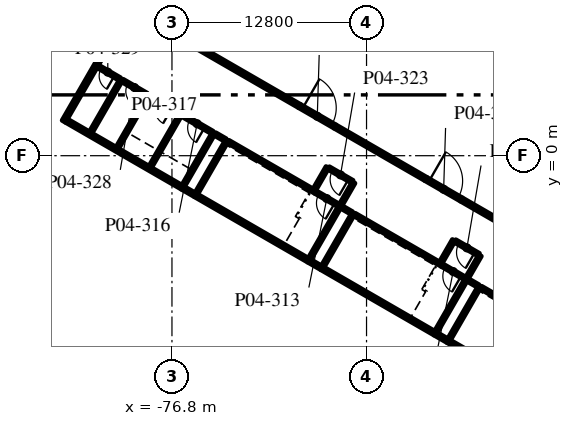
"""IFC4 building model, lengths in metres.
Left out: names, types, materials, properties, quantities, classifications, styles, units other than length and angle.
Written with IfcOpenShell. Run it as: python <this file> out.ifc"""

import sys

from ifc_helpers import new_model, si_unit, direction, frame, frame_2d, origin, place, context, subcontext, project, spatial, rectangle, extrude, element, fill, save


model = new_model("IFC4")
c1 = context("Model", 3, precision=1e-05, world=origin(), true_north=direction((0.0, 1.0)))
c2 = subcontext(c1, "Body", "Model", "MODEL_VIEW")
j1 = project(units=[si_unit("LENGTHUNIT", "METRE"), si_unit("PLANEANGLEUNIT", "RADIAN")], contexts=[c1])
p1 = place(None, origin())
s1 = spatial("IfcSite", under=j1, at=p1, CompositionType="ELEMENT")
p2 = place(p1, origin())
s2 = spatial("IfcBuilding", under=s1, at=p2, CompositionType="ELEMENT")
p3 = place(p2, frame((0.0, 0.0, 21.6)))
s3 = spatial("IfcBuildingStorey", under=s2, at=p3, CompositionType="ELEMENT", Elevation=21.6)
p4 = place(p3, frame((-83.915, 2.26, 0.0), z_axis=(0.0, 0.0, 1.0), x_axis=(0.499999331568, 0.866025789703, 0.0)))
e1 = element("IfcWall", 1, at=p4, inside=s3, PredefinedType="SOLIDWALL", context=c2, shape_type="SweptSolid", body=[
    extrude(rectangle(XDim=8.625, YDim=0.25, at=frame_2d((4.312, 0.0))), origin(), (0.0, 0.0, 1.0), 4.5),
])
p5 = place(p3, frame((-51.782, -6.333, 0.0), z_axis=(0.0, 0.0, 1.0), x_axis=(-0.866028853923, 0.499994024137, 0.0)))
e2 = element("IfcWall", 2, at=p5, inside=s3, PredefinedType="SOLIDWALL", context=c2, shape_type="SweptSolid", body=[
    extrude(rectangle(XDim=6.9, YDim=0.25, at=frame_2d((3.45, 0.0))), origin(), (0.0, 0.0, 1.0), 4.5),
])
p6 = place(p3, frame((-60.095, -1.533, 0.0), z_axis=(0.0, 0.0, 1.0), x_axis=(0.866036505625, -0.499980770555, 0.0)))
e3 = element("IfcWall", 3, at=p6, inside=s3, PredefinedType="SOLIDWALL", context=c2, shape_type="SweptSolid", body=[
    extrude(rectangle(XDim=2.7, YDim=0.25, at=frame_2d((1.35, 0.0))), origin(), (0.0, 0.0, 1.0), 4.5),
])
p7 = place(p6, frame((0.25, 0.0, 0.0)))
e4 = element("IfcOpeningElement", 4, at=p7, cuts=e3, PredefinedType="OPENING", context=c2, shape_type="SweptSolid", body=[
    extrude(rectangle(XDim=2.2, YDim=2.1, at=frame_2d((1.1, 1.05))), frame((0.0, 0.135, 0.0), z_axis=(0.0, -1.0, 0.0), x_axis=(1.0, 0.0, 0.0)), (0.0, 0.0, 1.0), 0.27),
])
p8 = place(p3, frame((-60.095, -1.533, 0.0), z_axis=(0.0, 0.0, 1.0), x_axis=(-0.866013532718, 0.500020560727, 0.0)))
e5 = element("IfcWall", 5, at=p8, inside=s3, PredefinedType="SOLIDWALL", context=c2, shape_type="SweptSolid", body=[
    extrude(rectangle(XDim=6.9, YDim=0.25, at=frame_2d((3.45, 0.0))), origin(), (0.0, 0.0, 1.0), 4.5),
])
p9 = place(p3, frame((-68.409, 3.267, 0.0), z_axis=(0.0, 0.0, 1.0), x_axis=(0.866059108428, -0.4999416173, 0.0)))
e6 = element("IfcWall", 6, at=p9, inside=s3, PredefinedType="SOLIDWALL", context=c2, shape_type="SweptSolid", body=[
    extrude(rectangle(XDim=2.7, YDim=0.25, at=frame_2d((1.35, 0.0))), origin(), (0.0, 0.0, 1.0), 4.5),
])
p10 = place(p9, frame((0.25, 0.0, 0.0)))
e7 = element("IfcOpeningElement", 7, at=p10, cuts=e6, PredefinedType="OPENING", context=c2, shape_type="SweptSolid", body=[
    extrude(rectangle(XDim=2.2, YDim=2.1, at=frame_2d((1.1, 1.05))), frame((0.0, 0.135, 0.0), z_axis=(0.0, -1.0, 0.0), x_axis=(1.0, 0.0, 0.0)), (0.0, 0.0, 1.0), 0.27),
])
p11 = place(p3, frame((-68.409, 3.267, 0.0), z_axis=(0.0, 0.0, 1.0), x_axis=(-0.866017240552, 0.500014138866, 0.0)))
e8 = element("IfcWall", 8, at=p11, inside=s3, PredefinedType="SOLIDWALL", context=c2, shape_type="SweptSolid", body=[
    extrude(rectangle(XDim=12.8, YDim=0.25, at=frame_2d((6.4, 0.0))), origin(), (0.0, 0.0, 1.0), 4.5),
])
p12 = place(p3, frame((-49.861, -17.256, 0.0), z_axis=(0.0, 0.0, 1.0), x_axis=(-0.866026575979, 0.499997969693, 0.0)))
e9 = element("IfcWall", 9, at=p12, inside=s3, PredefinedType="SOLIDWALL", context=c2, shape_type="SweptSolid", body=[
    extrude(rectangle(XDim=10.125, YDim=0.25, at=frame_2d((5.062, 0.0))), origin(), (0.0, 0.0, 1.0), 4.5),
])
p13 = place(p3, frame((-59.496, -11.694, 0.0), z_axis=(0.0, 0.0, 1.0), x_axis=(-0.866021068297, 0.500007509209, 0.0)))
e10 = element("IfcWall", 10, at=p13, inside=s3, PredefinedType="SOLIDWALL", context=c2, shape_type="SweptSolid", body=[
    extrude(rectangle(XDim=8.6, YDim=0.25, at=frame_2d((4.3, 0.0))), origin(), (0.0, 0.0, 1.0), 4.5),
])
p14 = place(p3, frame((-67.81, -6.894, 0.0), z_axis=(0.0, 0.0, 1.0), x_axis=(-0.866028165386, 0.499995216735, 0.0)))
e11 = element("IfcWall", 11, at=p14, inside=s3, PredefinedType="SOLIDWALL", context=c2, shape_type="SweptSolid", body=[
    extrude(rectangle(XDim=8.6, YDim=0.25, at=frame_2d((4.3, 0.0))), origin(), (0.0, 0.0, 1.0), 4.5),
])
p15 = place(p3, frame((-76.124, -2.094, 0.0), z_axis=(0.0, 0.0, 1.0), x_axis=(-0.866025267465, 0.500000236112, 0.0)))
e12 = element("IfcWall", 12, at=p15, inside=s3, PredefinedType="SOLIDWALL", context=c2, shape_type="SweptSolid", body=[
    extrude(rectangle(XDim=8.8, YDim=0.25, at=frame_2d((4.4, 0.0))), origin(), (0.0, 0.0, 1.0), 4.5),
])
for number, where, z_axis, x_axis in (
    (13, (-58.63, -12.194, 0.0), (0.0, 0.0, 1.0), (-0.866, 0.5, 0.0)),
    (14, (-66.944, -7.394, 0.0), (0.0, 0.0, 1.0), (-0.866, 0.5, 0.0)),
    (15, (-75.258, -2.594, 0.0), (0.0, 0.0, 1.0), (-0.866, 0.5, 0.0)),
):
    element("IfcWall", number, at=place(p3, frame(where, z_axis=z_axis, x_axis=x_axis)), inside=s3, PredefinedType="SOLIDWALL", context=c2, shape_type="SweptSolid", body=[
        extrude(rectangle(XDim=1.0, YDim=0.25, at=frame_2d((0.5, 0.0))), origin(), (0.0, 0.0, 1.0), 4.5),
    ])
for number, where, z_axis, x_axis in (
    (16, (-56.567, -8.621, 0.0), (0.0, 0.0, 1.0), (-0.5, -0.866, 0.0)),
    (17, (-57.433, -8.121, 0.0), (0.0, 0.0, 1.0), (-0.5, -0.866, 0.0)),
    (18, (-64.881, -3.821, 0.0), (0.0, 0.0, 1.0), (-0.5, -0.866, 0.0)),
    (19, (-65.747, -3.321, 0.0), (0.0, 0.0, 1.0), (-0.5, -0.866, 0.0)),
    (20, (-73.195, 0.979, 0.0), (0.0, 0.0, 1.0), (-0.5, -0.866, 0.0)),
):
    element("IfcWall", number, at=place(p3, frame(where, z_axis=z_axis, x_axis=x_axis)), inside=s3, PredefinedType="SOLIDWALL", context=c2, shape_type="SweptSolid", body=[
        extrude(rectangle(XDim=4.0, YDim=0.2, at=frame_2d((2.0, 0.0))), origin(), (0.0, 0.0, 1.0), 4.5),
    ])
p16 = place(p3, frame((-50.722, -11.996, 0.0), z_axis=(0.0, 0.0, 1.0), x_axis=(-0.866027239912, 0.49999681972, 0.0)))
e21 = element("IfcWall", 21, at=p16, inside=s3, PredefinedType="SOLIDWALL", context=c2, shape_type="SweptSolid", body=[
    extrude(rectangle(XDim=6.65, YDim=0.2, at=frame_2d((3.325, 0.0))), origin(), (0.0, 0.0, 1.0), 4.5),
])
p17 = place(p3, frame((-57.52, -8.071, 0.0), z_axis=(0.0, 0.0, 1.0), x_axis=(-0.866002029911, 0.500040482552, 0.0)))
e22 = element("IfcWall", 22, at=p17, inside=s3, PredefinedType="SOLIDWALL", context=c2, shape_type="SweptSolid", body=[
    extrude(rectangle(XDim=1.75, YDim=0.2, at=frame_2d((0.875, 0.0))), origin(), (0.0, 0.0, 1.0), 4.5),
])
p18 = place(p17, frame((0.3, 0.0, 0.0)))
e23 = element("IfcOpeningElement", 23, at=p18, cuts=e22, PredefinedType="OPENING", context=c2, shape_type="SweptSolid", body=[
    extrude(rectangle(XDim=1.2, YDim=2.1, at=frame_2d((0.6, 1.05))), frame((0.0, 0.11, 0.0), z_axis=(0.0, -1.0, 0.0), x_axis=(1.0, 0.0, 0.0)), (0.0, 0.0, 1.0), 0.22),
])
p19 = place(p3, frame((-59.035, -7.196, 0.0), z_axis=(0.0, 0.0, 1.0), x_axis=(-0.866027239912, 0.49999681972, 0.0)))
e24 = element("IfcWall", 24, at=p19, inside=s3, PredefinedType="SOLIDWALL", context=c2, shape_type="SweptSolid", body=[
    extrude(rectangle(XDim=6.65, YDim=0.2, at=frame_2d((3.325, 0.0))), origin(), (0.0, 0.0, 1.0), 4.5),
])
p20 = place(p3, frame((-65.834, -3.271, 0.0), z_axis=(0.0, 0.0, 1.0), x_axis=(-0.866036909293, 0.499980071345, 0.0)))
e25 = element("IfcWall", 25, at=p20, inside=s3, PredefinedType="SOLIDWALL", context=c2, shape_type="SweptSolid", body=[
    extrude(rectangle(XDim=1.75, YDim=0.2, at=frame_2d((0.875, 0.0))), origin(), (0.0, 0.0, 1.0), 4.5),
])
p21 = place(p20, frame((0.3, 0.0, 0.0)))
e26 = element("IfcOpeningElement", 26, at=p21, cuts=e25, PredefinedType="OPENING", context=c2, shape_type="SweptSolid", body=[
    extrude(rectangle(XDim=1.2, YDim=2.1, at=frame_2d((0.6, 1.05))), frame((0.0, 0.11, 0.0), z_axis=(0.0, -1.0, 0.0), x_axis=(1.0, 0.0, 0.0)), (0.0, 0.0, 1.0), 0.22),
])
p22 = place(p3, frame((-67.349, -2.396, 0.0), z_axis=(0.0, 0.0, 1.0), x_axis=(-0.86601134256, 0.500024353964, 0.0)))
e27 = element("IfcWall", 27, at=p22, inside=s3, PredefinedType="SOLIDWALL", context=c2, shape_type="SweptSolid", body=[
    extrude(rectangle(XDim=6.65, YDim=0.2, at=frame_2d((3.325, 0.0))), origin(), (0.0, 0.0, 1.0), 4.5),
])
for number, where, z_axis, x_axis in (
    (28, (-74.061, 1.479, 0.0), (0.0, 0.0, 1.0), (-0.5, -0.866, 0.0)),
    (29, (-76.226, 2.729, 0.0), (0.0, 0.0, 1.0), (-0.5, -0.866, 0.0)),
    (30, (-78.391, 3.979, 0.0), (0.0, 0.0, 1.0), (-0.5, -0.866, 0.0)),
):
    element("IfcWall", number, at=place(p3, frame(where, z_axis=z_axis, x_axis=x_axis)), inside=s3, PredefinedType="SOLIDWALL", context=c2, shape_type="SweptSolid", body=[
        extrude(rectangle(XDim=4.0, YDim=0.2, at=frame_2d((2.0, 0.0))), origin(), (0.0, 0.0, 1.0), 4.5),
    ])
p23 = place(p3, frame((-74.148, 1.529, 0.0), z_axis=(0.0, 0.0, 1.0), x_axis=(-0.865980515519, 0.500077740698, 0.0)))
e31 = element("IfcWall", 31, at=p23, inside=s3, PredefinedType="SOLIDWALL", context=c2, shape_type="SweptSolid", body=[
    extrude(rectangle(XDim=2.3, YDim=0.2, at=frame_2d((1.15, 0.0))), origin(), (0.0, 0.0, 1.0), 4.5),
])
p24 = place(p23, frame((0.6, 0.0, 0.0)))
e32 = element("IfcOpeningElement", 32, at=p24, cuts=e31, PredefinedType="OPENING", context=c2, shape_type="SweptSolid", body=[
    extrude(rectangle(XDim=1.1, YDim=2.1, at=frame_2d((0.55, 1.05))), frame((0.0, 0.11, 0.0), z_axis=(0.0, -1.0, 0.0), x_axis=(1.0, 0.0, 0.0)), (0.0, 0.0, 1.0), 0.22),
])
p25 = place(p3, frame((-76.313, 2.779, 0.0), z_axis=(0.0, 0.0, 1.0), x_axis=(-0.865980515519, 0.500077740698, 0.0)))
e33 = element("IfcWall", 33, at=p25, inside=s3, PredefinedType="SOLIDWALL", context=c2, shape_type="SweptSolid", body=[
    extrude(rectangle(XDim=2.3, YDim=0.2, at=frame_2d((1.15, 0.0))), origin(), (0.0, 0.0, 1.0), 4.5),
])
p26 = place(p25, frame((0.6, 0.0, 0.0)))
e34 = element("IfcOpeningElement", 34, at=p26, cuts=e33, PredefinedType="OPENING", context=c2, shape_type="SweptSolid", body=[
    extrude(rectangle(XDim=1.1, YDim=2.1, at=frame_2d((0.55, 1.05))), frame((0.0, 0.11, 0.0), z_axis=(0.0, -1.0, 0.0), x_axis=(1.0, 0.0, 0.0)), (0.0, 0.0, 1.0), 0.22),
])
for number, where, z_axis, x_axis in (
    (35, (-56.533, -6.562, 0.0), (0.0, 0.0, 1.0), (-0.5, -0.866, 0.0)),
    (36, (-58.265, -5.562, 0.0), (0.0, 0.0, 1.0), (-0.5, -0.866, 0.0)),
):
    element("IfcWall", number, at=place(p3, frame(where, z_axis=z_axis, x_axis=x_axis)), inside=s3, PredefinedType="PARTITIONING", context=c2, shape_type="SweptSolid", body=[
        extrude(rectangle(XDim=1.7, YDim=0.2, at=frame_2d((0.85, 0.0))), origin(), (0.0, 0.0, 1.0), 4.5),
    ])
for number, where, z_axis, x_axis in (
    (37, (-64.847, -1.763, 0.0), (0.0, 0.0, 1.0), (-0.5, -0.866, 0.0)),
    (38, (-66.579, -0.763, 0.0), (0.0, 0.0, 1.0), (-0.5, -0.866, 0.0)),
):
    element("IfcWall", number, at=place(p3, frame(where, z_axis=z_axis, x_axis=x_axis)), inside=s3, PredefinedType="PARTITIONING", context=c2, shape_type="SweptSolid", body=[
        extrude(rectangle(XDim=1.7, YDim=0.2, at=frame_2d((0.85, 0.0))), origin(), (0.0, 0.0, 1.0), 4.5),
    ])
p27 = place(p3, frame((-56.62, -6.513, 0.0), z_axis=(0.0, 0.0, 1.0), x_axis=(-0.865989075817, 0.500062916607, 0.0)))
e39 = element("IfcWall", 39, at=p27, inside=s3, PredefinedType="PARTITIONING", context=c2, shape_type="SweptSolid", body=[
    extrude(rectangle(XDim=1.8, YDim=0.2, at=frame_2d((0.9, 0.0))), origin(), (0.0, 0.0, 1.0), 4.5),
])
p28 = place(p27, frame((0.3, 0.0, 0.0)))
e40 = element("IfcOpeningElement", 40, at=p28, cuts=e39, PredefinedType="OPENING", context=c2, shape_type="SweptSolid", body=[
    extrude(rectangle(XDim=1.2, YDim=2.1, at=frame_2d((0.6, 1.05))), frame((0.0, 0.11, 0.0), z_axis=(0.0, -1.0, 0.0), x_axis=(1.0, 0.0, 0.0)), (0.0, 0.0, 1.0), 0.22),
])
p29 = place(p3, frame((-64.934, -1.713, 0.0), z_axis=(0.0, 0.0, 1.0), x_axis=(-0.866022985545, 0.500004188491, 0.0)))
e41 = element("IfcWall", 41, at=p29, inside=s3, PredefinedType="PARTITIONING", context=c2, shape_type="SweptSolid", body=[
    extrude(rectangle(XDim=1.8, YDim=0.2, at=frame_2d((0.9, 0.0))), origin(), (0.0, 0.0, 1.0), 4.5),
])
p30 = place(p29, frame((0.3, 0.0, 0.0)))
e42 = element("IfcOpeningElement", 42, at=p30, cuts=e41, PredefinedType="OPENING", context=c2, shape_type="SweptSolid", body=[
    extrude(rectangle(XDim=1.2, YDim=2.1, at=frame_2d((0.6, 1.05))), frame((0.0, 0.11, 0.0), z_axis=(0.0, -1.0, 0.0), x_axis=(1.0, 0.0, 0.0)), (0.0, 0.0, 1.0), 0.22),
])
p31 = place(p3, frame((-80.145, 4.991, 0.0), z_axis=(0.0, 0.0, 1.0), x_axis=(-0.49999894854, -0.866026010844, 0.0)))
e43 = element("IfcWall", 43, at=p31, inside=s3, PredefinedType="PARTITIONING", context=c2, shape_type="SweptSolid", body=[
    extrude(rectangle(XDim=4.0, YDim=0.2, at=frame_2d((2.0, 0.0))), origin(), (0.0, 0.0, 1.0), 4.5),
])
p32 = place(p3, frame((-78.478, 4.029, 0.0), z_axis=(0.0, 0.0, 1.0), x_axis=(-0.865978377894, 0.500081442387, 0.0)))
e44 = element("IfcWall", 44, at=p32, inside=s3, PredefinedType="PARTITIONING", context=c2, shape_type="SweptSolid", body=[
    extrude(rectangle(XDim=1.825, YDim=0.2, at=frame_2d((0.913, 0.0))), origin(), (0.0, 0.0, 1.0), 4.5),
])
p33 = place(p32, frame((0.413, 0.0, 0.0)))
e45 = element("IfcOpeningElement", 45, at=p33, cuts=e44, PredefinedType="OPENING", context=c2, shape_type="SweptSolid", body=[
    extrude(rectangle(XDim=1.0, YDim=2.1, at=frame_2d((0.5, 1.05))), frame((0.0, 0.11, 0.0), z_axis=(0.0, -1.0, 0.0), x_axis=(1.0, 0.0, 0.0)), (0.0, 0.0, 1.0), 0.22),
])
p34 = place(p3, frame((-80.231, 5.041, 0.0), z_axis=(0.0, 0.0, 1.0), x_axis=(-0.865964676353, 0.500105168249, 0.0)))
e46 = element("IfcWall", 46, at=p34, inside=s3, PredefinedType="PARTITIONING", context=c2, shape_type="SweptSolid", body=[
    extrude(rectangle(XDim=1.675, YDim=0.2, at=frame_2d((0.837, 0.0))), origin(), (0.0, 0.0, 1.0), 4.5),
])
p35 = place(p34, frame((0.413, 0.0, 0.0)))
e47 = element("IfcOpeningElement", 47, at=p35, cuts=e46, PredefinedType="OPENING", context=c2, shape_type="SweptSolid", body=[
    extrude(rectangle(XDim=1.0, YDim=2.1, at=frame_2d((0.5, 1.05))), frame((0.0, 0.11, 0.0), z_axis=(0.0, -1.0, 0.0), x_axis=(1.0, 0.0, 0.0)), (0.0, 0.0, 1.0), 0.22),
])
p36 = place(p3, frame((-56.654, -8.571, 0.0), z_axis=(0.0, 0.0, 1.0), x_axis=(-0.866094119867, 0.499880961361, 0.0)))
e48 = element("IfcWall", 48, at=p36, inside=s3, PredefinedType="PARTITIONING", context=c2, shape_type="SweptSolid", body=[
    extrude(rectangle(XDim=0.8, YDim=0.2, at=frame_2d((0.4, 0.0))), origin(), (0.0, 0.0, 1.0), 4.5),
])
p37 = place(p3, frame((-64.968, -3.771, 0.0), z_axis=(0.0, 0.0, 1.0), x_axis=(-0.865885638426, 0.500242002602, 0.0)))
e49 = element("IfcWall", 49, at=p37, inside=s3, PredefinedType="PARTITIONING", context=c2, shape_type="SweptSolid", body=[
    extrude(rectangle(XDim=0.8, YDim=0.2, at=frame_2d((0.4, 0.0))), origin(), (0.0, 0.0, 1.0), 4.5),
])
p38 = place(p3, frame((-73.281, 1.029, 0.0), z_axis=(0.0, 0.0, 1.0), x_axis=(-0.865961984968, 0.500109828528, 0.0)))
e50 = element("IfcWall", 50, at=p38, inside=s3, PredefinedType="PARTITIONING", context=c2, shape_type="SweptSolid", body=[
    extrude(rectangle(XDim=0.8, YDim=0.2, at=frame_2d((0.4, 0.0))), origin(), (0.0, 0.0, 1.0), 4.5),
])
p39 = place(p7, origin())
e51 = element("IfcDoor", 51, at=p39, inside=s3, OperationType="DOUBLE_DOOR_SINGLE_SWING", PredefinedType="DOOR", context=c2, shape_type="SweptSolid", body=[
    extrude(rectangle(XDim=2.2, YDim=2.1, at=frame_2d((1.1, 1.05))), frame((0.0, 0.025, 0.0), z_axis=(0.0, -1.0, 0.0), x_axis=(1.0, 0.0, 0.0)), (0.0, 0.0, 1.0), 0.05),
])
fill(e4, e51)
p40 = place(p10, origin())
e52 = element("IfcDoor", 52, at=p40, inside=s3, OperationType="DOUBLE_DOOR_SINGLE_SWING", PredefinedType="DOOR", context=c2, shape_type="SweptSolid", body=[
    extrude(rectangle(XDim=2.2, YDim=2.1, at=frame_2d((1.1, 1.05))), frame((0.0, 0.025, 0.0), z_axis=(0.0, -1.0, 0.0), x_axis=(1.0, 0.0, 0.0)), (0.0, 0.0, 1.0), 0.05),
])
fill(e7, e52)
p41 = place(p18, origin())
e53 = element("IfcDoor", 53, at=p41, inside=s3, OperationType="SINGLE_SWING_LEFT", PredefinedType="DOOR", context=c2, shape_type="SweptSolid", body=[
    extrude(rectangle(XDim=1.2, YDim=2.1, at=frame_2d((0.6, 1.05))), frame((0.0, 0.025, 0.0), z_axis=(0.0, -1.0, 0.0), x_axis=(1.0, 0.0, 0.0)), (0.0, 0.0, 1.0), 0.05),
])
fill(e23, e53)
p42 = place(p21, origin())
e54 = element("IfcDoor", 54, at=p42, inside=s3, OperationType="SINGLE_SWING_LEFT", PredefinedType="DOOR", context=c2, shape_type="SweptSolid", body=[
    extrude(rectangle(XDim=1.2, YDim=2.1, at=frame_2d((0.6, 1.05))), frame((0.0, 0.025, 0.0), z_axis=(0.0, -1.0, 0.0), x_axis=(1.0, 0.0, 0.0)), (0.0, 0.0, 1.0), 0.05),
])
fill(e26, e54)
p43 = place(p24, origin())
e55 = element("IfcDoor", 55, at=p43, inside=s3, OperationType="DOUBLE_DOOR_SLIDING", PredefinedType="DOOR", context=c2, shape_type="SweptSolid", body=[
    extrude(rectangle(XDim=1.1, YDim=2.1, at=frame_2d((0.55, 1.05))), frame((0.0, 0.025, 0.0), z_axis=(0.0, -1.0, 0.0), x_axis=(1.0, 0.0, 0.0)), (0.0, 0.0, 1.0), 0.05),
])
fill(e32, e55)
p44 = place(p26, origin())
e56 = element("IfcDoor", 56, at=p44, inside=s3, OperationType="DOUBLE_DOOR_SLIDING", PredefinedType="DOOR", context=c2, shape_type="SweptSolid", body=[
    extrude(rectangle(XDim=1.1, YDim=2.1, at=frame_2d((0.55, 1.05))), frame((0.0, 0.025, 0.0), z_axis=(0.0, -1.0, 0.0), x_axis=(1.0, 0.0, 0.0)), (0.0, 0.0, 1.0), 0.05),
])
fill(e34, e56)
p45 = place(p28, origin())
e57 = element("IfcDoor", 57, at=p45, inside=s3, OperationType="SINGLE_SWING_LEFT", PredefinedType="DOOR", context=c2, shape_type="SweptSolid", body=[
    extrude(rectangle(XDim=1.2, YDim=2.1, at=frame_2d((0.6, 1.05))), frame((0.0, 0.025, 0.0), z_axis=(0.0, -1.0, 0.0), x_axis=(1.0, 0.0, 0.0)), (0.0, 0.0, 1.0), 0.05),
])
fill(e40, e57)
p46 = place(p30, origin())
e58 = element("IfcDoor", 58, at=p46, inside=s3, OperationType="SINGLE_SWING_LEFT", PredefinedType="DOOR", context=c2, shape_type="SweptSolid", body=[
    extrude(rectangle(XDim=1.2, YDim=2.1, at=frame_2d((0.6, 1.05))), frame((0.0, 0.025, 0.0), z_axis=(0.0, -1.0, 0.0), x_axis=(1.0, 0.0, 0.0)), (0.0, 0.0, 1.0), 0.05),
])
fill(e42, e58)
p47 = place(p33, origin())
e59 = element("IfcDoor", 59, at=p47, inside=s3, OperationType="SINGLE_SWING_LEFT", PredefinedType="DOOR", context=c2, shape_type="SweptSolid", body=[
    extrude(rectangle(XDim=1.0, YDim=2.1, at=frame_2d((0.5, 1.05))), frame((0.0, 0.025, 0.0), z_axis=(0.0, -1.0, 0.0), x_axis=(1.0, 0.0, 0.0)), (0.0, 0.0, 1.0), 0.05),
])
fill(e45, e59)
p48 = place(p35, origin())
e60 = element("IfcDoor", 60, at=p48, inside=s3, OperationType="SINGLE_SWING_LEFT", PredefinedType="DOOR", context=c2, shape_type="SweptSolid", body=[
    extrude(rectangle(XDim=1.0, YDim=2.1, at=frame_2d((0.5, 1.05))), frame((0.0, 0.025, 0.0), z_axis=(0.0, -1.0, 0.0), x_axis=(1.0, 0.0, 0.0)), (0.0, 0.0, 1.0), 0.05),
])
fill(e47, e60)
save(model, sys.argv[1])
